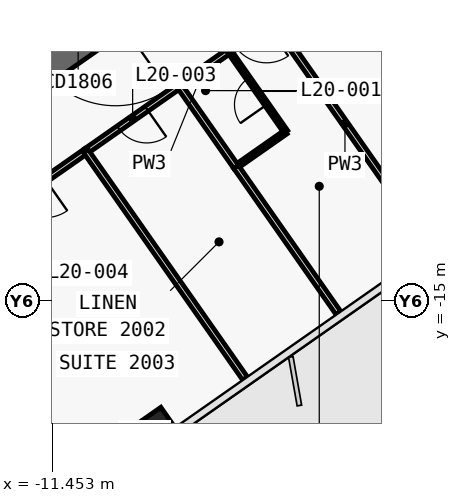
"""IFC4 building model, lengths in metres.
Left out: names, types, materials, properties, quantities, classifications, styles, units other than length and angle.
Written with IfcOpenShell. Run it as: python <this file> out.ifc"""

import sys

from ifc_helpers import new_model, si_unit, direction, frame, frame_2d, origin, origin_2d, place, context, subcontext, project, spatial, polyline, rectangle, outline, extrude, element, fill, save


model = new_model("IFC4")
c1 = context("Model", 3, precision=1e-05, world=origin(), true_north=direction((0.0, 1.0)))
c2 = subcontext(c1, "Body", "Model", "MODEL_VIEW")
j1 = project(units=[si_unit("LENGTHUNIT", "METRE"), si_unit("PLANEANGLEUNIT", "RADIAN")], contexts=[c1])
p1 = place(None, origin())
s1 = spatial("IfcSite", under=j1, at=p1, CompositionType="ELEMENT")
p2 = place(p1, origin())
s2 = spatial("IfcBuilding", under=s1, at=p2, CompositionType="ELEMENT")
p3 = place(p2, frame((0.0, 0.0, 97.7)))
s3 = spatial("IfcBuildingStorey", under=s2, at=p3, CompositionType="ELEMENT", Elevation=97.7)
p4 = place(p3, frame((0.037, -0.585, 0.0), z_axis=(0.0, 0.0, 1.0), x_axis=(-0.819157152511, -0.573569140985, 0.0)))
e1 = element("IfcWall", 1, at=p4, inside=s3, PredefinedType="SHEAR", context=c2, shape_type="SweptSolid", body=[
    extrude(outline(polyline([(26.695, 0.5), (0.7, 0.5), (0.0, -0.5), (26.695, -0.5), (26.695, 0.5)])), origin(), (0.0, 0.0, 1.0), 3.6),
])
p5 = place(p4, frame((2.995, 0.0, 0.0)))
e2 = element("IfcOpeningElement", 2, at=p5, cuts=e1, PredefinedType="OPENING", context=c2, shape_type="SweptSolid", body=[
    extrude(rectangle(XDim=2.4, YDim=2.1, at=frame_2d((1.2, 1.05))), frame((0.0, 0.51, 0.0), z_axis=(0.0, -1.0, 0.0), x_axis=(1.0, 0.0, 0.0)), (0.0, 0.0, 1.0), 1.02),
])
p6 = place(p4, frame((11.995, 0.0, 0.0)))
e3 = element("IfcOpeningElement", 3, at=p6, cuts=e1, PredefinedType="OPENING", context=c2, shape_type="SweptSolid", body=[
    extrude(rectangle(XDim=2.4, YDim=2.1, at=frame_2d((1.2, 1.05))), frame((0.0, 0.51, 0.0), z_axis=(0.0, -1.0, 0.0), x_axis=(1.0, 0.0, 0.0)), (0.0, 0.0, 1.0), 1.02),
])
p7 = place(p3, frame((-2.638, 3.768, 0.0), z_axis=(0.0, 0.0, 1.0), x_axis=(-0.819148977158, -0.573580816643, 0.0)))
e4 = element("IfcWall", 4, at=p7, inside=s3, PredefinedType="SHEAR", context=c2, shape_type="SweptSolid", body=[
    extrude(outline(polyline([(26.0, 0.25), (0.0, 0.25), (0.0, -0.25), (26.0, -0.25), (26.0, 0.25)])), origin(), (0.0, 0.0, 1.0), 3.6),
])
p8 = place(p7, frame((1.169, 0.0, 0.0)))
e5 = element("IfcOpeningElement", 5, at=p8, cuts=e4, PredefinedType="OPENING", context=c2, shape_type="SweptSolid", body=[
    extrude(rectangle(XDim=1.1, YDim=2.1, at=frame_2d((0.55, 1.05))), frame((0.0, 0.26, 0.0), z_axis=(0.0, -1.0, 0.0), x_axis=(1.0, 0.0, 0.0)), (0.0, 0.0, 1.0), 0.52),
])
p9 = place(p7, frame((3.206, 0.0, 0.0)))
e6 = element("IfcOpeningElement", 6, at=p9, cuts=e4, PredefinedType="OPENING", context=c2, shape_type="SweptSolid", body=[
    extrude(rectangle(XDim=1.1, YDim=2.1, at=frame_2d((0.55, 1.05))), frame((0.0, 0.26, 0.0), z_axis=(0.0, -1.0, 0.0), x_axis=(1.0, 0.0, 0.0)), (0.0, 0.0, 1.0), 0.52),
])
p10 = place(p7, frame((5.244, 0.0, 0.0)))
e7 = element("IfcOpeningElement", 7, at=p10, cuts=e4, PredefinedType="OPENING", context=c2, shape_type="SweptSolid", body=[
    extrude(rectangle(XDim=1.1, YDim=2.1, at=frame_2d((0.55, 1.05))), frame((0.0, 0.26, 0.0), z_axis=(0.0, -1.0, 0.0), x_axis=(1.0, 0.0, 0.0)), (0.0, 0.0, 1.0), 0.52),
])
p11 = place(p7, frame((7.281, 0.0, 0.0)))
e8 = element("IfcOpeningElement", 8, at=p11, cuts=e4, PredefinedType="OPENING", context=c2, shape_type="SweptSolid", body=[
    extrude(rectangle(XDim=1.1, YDim=2.1, at=frame_2d((0.55, 1.05))), frame((0.0, 0.26, 0.0), z_axis=(0.0, -1.0, 0.0), x_axis=(1.0, 0.0, 0.0)), (0.0, 0.0, 1.0), 0.52),
])
p12 = place(p7, frame((9.688, 0.0, 0.0)))
e9 = element("IfcOpeningElement", 9, at=p12, cuts=e4, PredefinedType="OPENING", context=c2, shape_type="SweptSolid", body=[
    extrude(rectangle(XDim=1.1, YDim=2.1, at=frame_2d((0.55, 1.05))), frame((0.0, 0.26, 0.0), z_axis=(0.0, -1.0, 0.0), x_axis=(1.0, 0.0, 0.0)), (0.0, 0.0, 1.0), 0.52),
])
p13 = place(p7, frame((11.863, 0.0, 0.0)))
e10 = element("IfcOpeningElement", 10, at=p13, cuts=e4, PredefinedType="OPENING", context=c2, shape_type="SweptSolid", body=[
    extrude(rectangle(XDim=1.1, YDim=2.1, at=frame_2d((0.55, 1.05))), frame((0.0, 0.26, 0.0), z_axis=(0.0, -1.0, 0.0), x_axis=(1.0, 0.0, 0.0)), (0.0, 0.0, 1.0), 0.52),
])
p14 = place(p7, frame((14.038, 0.0, 0.0)))
e11 = element("IfcOpeningElement", 11, at=p14, cuts=e4, PredefinedType="OPENING", context=c2, shape_type="SweptSolid", body=[
    extrude(rectangle(XDim=1.1, YDim=2.1, at=frame_2d((0.55, 1.05))), frame((0.0, 0.26, 0.0), z_axis=(0.0, -1.0, 0.0), x_axis=(1.0, 0.0, 0.0)), (0.0, 0.0, 1.0), 0.52),
])
p15 = place(p7, frame((16.212, 0.0, 0.0)))
e12 = element("IfcOpeningElement", 12, at=p15, cuts=e4, PredefinedType="OPENING", context=c2, shape_type="SweptSolid", body=[
    extrude(rectangle(XDim=1.1, YDim=2.1, at=frame_2d((0.55, 1.05))), frame((0.0, 0.26, 0.0), z_axis=(0.0, -1.0, 0.0), x_axis=(1.0, 0.0, 0.0)), (0.0, 0.0, 1.0), 0.52),
])
p16 = place(p3, frame((-9.038, -18.475, 0.0), z_axis=(0.0, 0.0, 1.0), x_axis=(-0.819152044289, -0.573576436351, 0.0)))
e13 = element("IfcColumn", 13, at=p16, inside=s3, PredefinedType="COLUMN", context=c2, shape_type="SweptSolid", body=[
    extrude(rectangle(XDim=1.5, YDim=0.6, at=origin_2d()), origin(), (0.0, 0.0, 1.0), 3.6),
])
p17 = place(p3, frame((-5.652, -7.62, 0.0), z_axis=(0.0, 0.0, 1.0), x_axis=(-0.819207359301, -0.573497430219, 0.0)))
e14 = element("IfcWall", 14, at=p17, inside=s3, PredefinedType="PARTITIONING", context=c2, shape_type="SweptSolid", body=[
    extrude(rectangle(XDim=1.401, YDim=0.15, at=frame_2d((0.7, 0.0))), origin(), (0.0, 0.0, 1.0), 2.6),
])
p18 = place(p17, frame((0.2, 0.0, 0.0)))
e15 = element("IfcOpeningElement", 15, at=p18, cuts=e14, PredefinedType="OPENING", context=c2, shape_type="SweptSolid", body=[
    extrude(rectangle(XDim=1.0, YDim=2.1, at=frame_2d((0.5, 1.05))), frame((0.0, 0.085, 0.0), z_axis=(0.0, -1.0, 0.0), x_axis=(1.0, 0.0, 0.0)), (0.0, 0.0, 1.0), 0.17),
])
p19 = place(p3, frame((-6.797, -8.421, 0.0), z_axis=(0.0, 0.0, 1.0), x_axis=(-0.8190674132, -0.573697283098, 0.0)))
e16 = element("IfcWall", 16, at=p19, inside=s3, PredefinedType="PARTITIONING", context=c2, shape_type="SweptSolid", body=[
    extrude(rectangle(XDim=1.604, YDim=0.15, at=frame_2d((0.802, 0.0))), origin(), (0.0, 0.0, 1.0), 3.32),
])
p20 = place(p3, frame((-8.107, -9.339, 0.0), z_axis=(0.0, 0.0, 1.0), x_axis=(-0.819128818764, -0.573609604409, 0.0)))
e17 = element("IfcWall", 17, at=p20, inside=s3, PredefinedType="PARTITIONING", context=c2, shape_type="SweptSolid", body=[
    extrude(rectangle(XDim=3.004, YDim=0.15, at=frame_2d((1.502, 0.0))), origin(), (0.0, 0.0, 1.0), 3.32),
])
p21 = place(p20, frame((1.052, 0.0, 0.0)))
e18 = element("IfcOpeningElement", 18, at=p21, cuts=e17, PredefinedType="OPENING", context=c2, shape_type="SweptSolid", body=[
    extrude(rectangle(XDim=0.9, YDim=2.1, at=frame_2d((0.45, 1.05))), frame((0.0, 0.085, 0.0), z_axis=(0.0, -1.0, 0.0), x_axis=(1.0, 0.0, 0.0)), (0.0, 0.0, 1.0), 0.17),
])
p22 = place(p3, frame((-10.565, -11.06, 0.0), z_axis=(0.0, 0.0, 1.0), x_axis=(-0.819145961204, -0.573585123798, 0.0)))
e19 = element("IfcWall", 19, at=p22, inside=s3, PredefinedType="PARTITIONING", context=c2, shape_type="SweptSolid", body=[
    extrude(rectangle(XDim=3.603, YDim=0.15, at=frame_2d((1.802, 0.0))), origin(), (0.0, 0.0, 1.0), 2.6),
])
p23 = place(p22, frame((1.302, 0.0, 0.0)))
e20 = element("IfcOpeningElement", 20, at=p23, cuts=e19, PredefinedType="OPENING", context=c2, shape_type="SweptSolid", body=[
    extrude(rectangle(XDim=1.0, YDim=2.1, at=frame_2d((0.5, 1.05))), frame((0.0, 0.085, 0.0), z_axis=(0.0, -1.0, 0.0), x_axis=(1.0, 0.0, 0.0)), (0.0, 0.0, 1.0), 0.17),
])
p24 = place(p3, frame((-1.849, -13.051, 0.0), z_axis=(0.0, 0.0, 1.0), x_axis=(-0.573575988258, 0.819152358047, 0.0)))
e21 = element("IfcWall", 21, at=p24, inside=s3, PredefinedType="PARTITIONING", context=c2, shape_type="SweptSolid", body=[
    extrude(rectangle(XDim=6.632, YDim=0.15, at=frame_2d((3.316, 0.0))), origin(), (0.0, 0.0, 1.0), 2.6),
])
p25 = place(p3, frame((-6.617, -11.471, 0.0), z_axis=(0.0, 0.0, 1.0), x_axis=(0.819131543282, 0.57360571371, 0.0)))
e22 = element("IfcWall", 22, at=p25, inside=s3, PredefinedType="PARTITIONING", context=c2, shape_type="SweptSolid", body=[
    extrude(rectangle(XDim=1.6, YDim=0.12, at=frame_2d((0.8, 0.0))), origin(), (0.0, 0.0, 1.0), 3.32),
])
p26 = place(p3, frame((-5.306, -10.552, 0.0), z_axis=(0.0, 0.0, 1.0), x_axis=(-0.573537965655, 0.819178980414, 0.0)))
e23 = element("IfcWall", 23, at=p26, inside=s3, PredefinedType="PARTITIONING", context=c2, shape_type="SweptSolid", body=[
    extrude(rectangle(XDim=2.6, YDim=0.12, at=frame_2d((1.3, 0.0))), origin(), (0.0, 0.0, 1.0), 3.32),
])
p27 = place(p26, frame((0.875, 0.0, 0.0)))
e24 = element("IfcOpeningElement", 24, at=p27, cuts=e23, PredefinedType="OPENING", context=c2, shape_type="SweptSolid", body=[
    extrude(rectangle(XDim=0.85, YDim=2.05, at=frame_2d((0.425, 1.025))), frame((0.0, 0.07, 0.0), z_axis=(0.0, -1.0, 0.0), x_axis=(1.0, 0.0, 0.0)), (0.0, 0.0, 1.0), 0.14),
])
p28 = place(p3, frame((-3.922, -15.32, 0.0), z_axis=(0.0, 0.0, 1.0), x_axis=(-0.573535567792, 0.819180659243, 0.0)))
e25 = element("IfcWall", 25, at=p28, inside=s3, PredefinedType="PARTITIONING", context=c2, shape_type="SweptSolid", body=[
    extrude(rectangle(XDim=4.699, YDim=0.15, at=frame_2d((2.35, 0.0))), origin(), (0.0, 0.0, 1.0), 2.5),
])
p29 = place(p3, frame((-6.618, -11.47, 0.0), z_axis=(0.0, 0.0, 1.0), x_axis=(-0.573537965655, 0.819178980414, 0.0)))
e26 = element("IfcWall", 26, at=p29, inside=s3, PredefinedType="PARTITIONING", context=c2, shape_type="SweptSolid", body=[
    extrude(rectangle(XDim=2.6, YDim=0.15, at=frame_2d((1.3, 0.0))), origin(), (0.0, 0.0, 1.0), 3.32),
])
p30 = place(p3, frame((-6.379, -17.041, 0.0), z_axis=(0.0, 0.0, 1.0), x_axis=(-0.573579051994, 0.81915021279, 0.0)))
e27 = element("IfcWall", 27, at=p30, inside=s3, PredefinedType="PARTITIONING", context=c2, shape_type="SweptSolid", body=[
    extrude(rectangle(XDim=7.3, YDim=0.15, at=frame_2d((3.65, 0.0))), origin(), (0.0, 0.0, 1.0), 2.5),
])
p31 = place(p3, frame((-11.294, -20.482, 0.0), z_axis=(0.0, 0.0, 1.0), x_axis=(-0.573589807488, 0.819142681555, 0.0)))
e28 = element("IfcWall", 28, at=p31, inside=s3, PredefinedType="PARTITIONING", context=c2, shape_type="SweptSolid", body=[
    extrude(rectangle(XDim=4.499, YDim=0.15, at=frame_2d((2.25, 0.0))), origin(), (0.0, 0.0, 1.0), 2.5),
])
p32 = place(p6, origin())
e29 = element("IfcDoor", 29, at=p32, inside=s3, OperationType="DOUBLE_DOOR_SINGLE_SWING", PredefinedType="DOOR", context=c2, shape_type="SweptSolid", body=[
    extrude(rectangle(XDim=2.4, YDim=2.1, at=frame_2d((1.2, 1.05))), frame((0.0, 0.025, 0.0), z_axis=(0.0, -1.0, 0.0), x_axis=(1.0, 0.0, 0.0)), (0.0, 0.0, 1.0), 0.05),
])
fill(e3, e29)
p33 = place(p27, origin())
e30 = element("IfcDoor", 30, at=p33, inside=s3, OperationType="SINGLE_SWING_RIGHT", PredefinedType="DOOR", context=c2, shape_type="SweptSolid", body=[
    extrude(rectangle(XDim=0.85, YDim=2.05, at=frame_2d((0.425, 1.025))), frame((0.0, 0.025, 0.0), z_axis=(0.0, -1.0, 0.0), x_axis=(1.0, 0.0, 0.0)), (0.0, 0.0, 1.0), 0.05),
])
fill(e24, e30)
p34 = place(p21, origin())
e31 = element("IfcDoor", 31, at=p34, inside=s3, OperationType="SINGLE_SWING_RIGHT", PredefinedType="DOOR", context=c2, shape_type="SweptSolid", body=[
    extrude(rectangle(XDim=0.9, YDim=2.1, at=frame_2d((0.45, 1.05))), frame((0.0, 0.025, 0.0), z_axis=(0.0, -1.0, 0.0), x_axis=(1.0, 0.0, 0.0)), (0.0, 0.0, 1.0), 0.05),
])
fill(e18, e31)
save(model, sys.argv[1])
